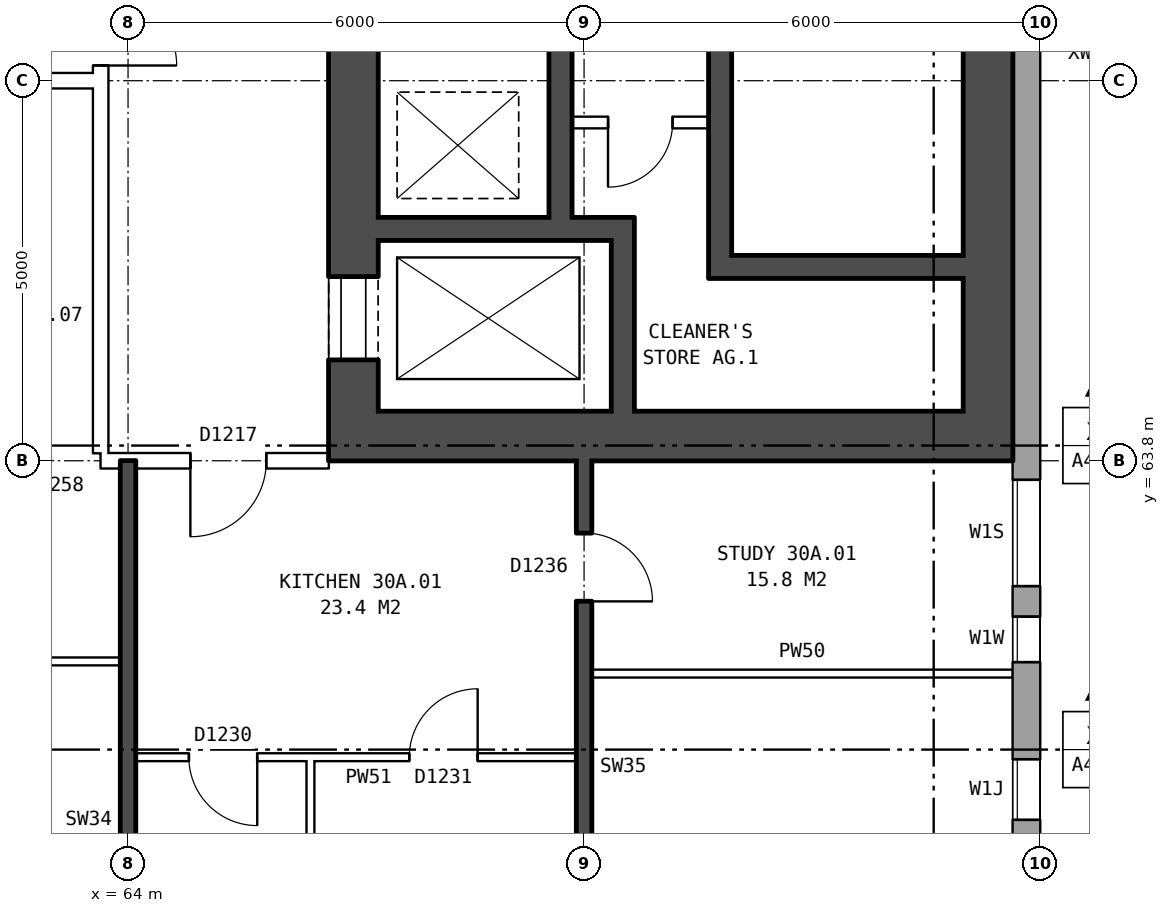
"""IFC4 building model, lengths in metres.
Left out: names, types, materials, properties, quantities, classifications, styles, units other than length and angle.
Written with IfcOpenShell. Run it as: python <this file> out.ifc"""

import sys

from ifc_helpers import new_model, si_unit, direction, frame, frame_2d, origin, place, context, subcontext, project, spatial, rectangle, extrude, element, fill, save


model = new_model("IFC4")
c1 = context("Model", 3, precision=1e-05, world=origin(), true_north=direction((0.0, 1.0)))
c2 = subcontext(c1, "Body", "Model", "MODEL_VIEW")
j1 = project(units=[si_unit("LENGTHUNIT", "METRE"), si_unit("PLANEANGLEUNIT", "RADIAN")], contexts=[c1])
p1 = place(None, origin())
s1 = spatial("IfcSite", under=j1, at=p1, CompositionType="ELEMENT")
p2 = place(p1, origin())
s2 = spatial("IfcBuilding", under=s1, at=p2, CompositionType="ELEMENT")
p3 = place(p2, frame((0.0, 0.0, 108.8)))
s3 = spatial("IfcBuildingStorey", under=s2, at=p3, CompositionType="ELEMENT", Elevation=108.8)
p4 = place(p3, frame((75.82, 57.075, 0.0), z_axis=(0.0, 0.0, 1.0), x_axis=(0.0, 1.0, 0.0)))
e1 = element("IfcWall", 1, at=p4, inside=s3, PredefinedType="STANDARD", context=c2, shape_type="SweptSolid", body=[
    extrude(rectangle(XDim=25.851, YDim=0.36, at=frame_2d((12.925, 0.0))), origin(), (0.0, 0.0, 1.0), 2.85),
])
p5 = place(p4, frame((0.3, 0.0, 0.8)))
e2 = element("IfcOpeningElement", 2, at=p5, cuts=e1, PredefinedType="OPENING", context=c2, shape_type="SweptSolid", body=[
    extrude(rectangle(XDim=1.4, YDim=1.8, at=frame_2d((0.7, 0.9))), frame((0.0, 0.19, 0.0), z_axis=(0.0, -1.0, 0.0), x_axis=(1.0, 0.0, 0.0)), (0.0, 0.0, 1.0), 0.38),
])
p6 = place(p4, frame((4.075, 0.0, 0.25)))
e3 = element("IfcOpeningElement", 3, at=p6, cuts=e1, PredefinedType="OPENING", context=c2, shape_type="SweptSolid", body=[
    extrude(rectangle(XDim=0.6, YDim=0.9, at=frame_2d((0.3, 0.45))), frame((0.0, 0.19, 0.0), z_axis=(0.0, -1.0, 0.0), x_axis=(1.0, 0.0, 0.0)), (0.0, 0.0, 1.0), 0.38),
])
p7 = place(p4, frame((19.225, 0.0, 1.7)))
e4 = element("IfcOpeningElement", 4, at=p7, cuts=e1, PredefinedType="OPENING", context=c2, shape_type="SweptSolid", body=[
    extrude(rectangle(XDim=1.6, YDim=0.9, at=frame_2d((0.8, 0.45))), frame((0.0, 0.19, 0.0), z_axis=(0.0, -1.0, 0.0), x_axis=(1.0, 0.0, 0.0)), (0.0, 0.0, 1.0), 0.38),
])
p8 = place(p4, frame((21.975, 0.0, 0.8)))
e5 = element("IfcOpeningElement", 5, at=p8, cuts=e1, PredefinedType="OPENING", context=c2, shape_type="SweptSolid", body=[
    extrude(rectangle(XDim=1.2, YDim=0.9, at=frame_2d((0.6, 0.45))), frame((0.0, 0.19, 0.0), z_axis=(0.0, -1.0, 0.0), x_axis=(1.0, 0.0, 0.0)), (0.0, 0.0, 1.0), 0.38),
])
p9 = place(p4, frame((2.0, 0.0, 0.8)))
e6 = element("IfcOpeningElement", 6, at=p9, cuts=e1, PredefinedType="OPENING", context=c2, shape_type="SweptSolid", body=[
    extrude(rectangle(XDim=0.8, YDim=1.5, at=frame_2d((0.4, 0.75))), frame((0.0, 0.19, 0.0), z_axis=(0.0, -1.0, 0.0), x_axis=(1.0, 0.0, 0.0)), (0.0, 0.0, 1.0), 0.38),
])
p10 = place(p4, frame((5.075, 0.0, 1.65)))
e7 = element("IfcOpeningElement", 7, at=p10, cuts=e1, PredefinedType="OPENING", context=c2, shape_type="SweptSolid", body=[
    extrude(rectangle(XDim=1.4, YDim=0.9, at=frame_2d((0.7, 0.45))), frame((0.0, 0.19, 0.0), z_axis=(0.0, -1.0, 0.0), x_axis=(1.0, 0.0, 0.0)), (0.0, 0.0, 1.0), 0.38),
])
p11 = place(p4, frame((23.475, 0.0, 0.8)))
e8 = element("IfcOpeningElement", 8, at=p11, cuts=e1, PredefinedType="OPENING", context=c2, shape_type="SweptSolid", body=[
    extrude(rectangle(XDim=1.2, YDim=1.8, at=frame_2d((0.6, 0.9))), frame((0.0, 0.19, 0.0), z_axis=(0.0, -1.0, 0.0), x_axis=(1.0, 0.0, 0.0)), (0.0, 0.0, 1.0), 0.38),
])
p12 = place(p3, frame((66.965, 64.45, 0.0), z_axis=(0.0, 0.0, 1.0), x_axis=(0.0, 1.0, 0.0)))
e9 = element("IfcWall", 9, at=p12, inside=s3, PredefinedType="SHEAR", context=c2, shape_type="SweptSolid", body=[
    extrude(rectangle(XDim=11.1, YDim=0.65, at=frame_2d((5.55, 0.0))), origin(), (0.0, 0.0, 1.0), 2.85),
])
p13 = place(p12, frame((0.675, 0.0, 0.0)))
e10 = element("IfcOpeningElement", 10, at=p13, cuts=e9, PredefinedType="OPENING", context=c2, shape_type="SweptSolid", body=[
    extrude(rectangle(XDim=1.1, YDim=2.1, at=frame_2d((0.55, 1.05))), frame((0.0, 0.335, 0.0), z_axis=(0.0, -1.0, 0.0), x_axis=(1.0, 0.0, 0.0)), (0.0, 0.0, 1.0), 0.67),
])
p14 = place(p12, frame((9.25, 0.0, 0.0)))
e11 = element("IfcOpeningElement", 11, at=p14, cuts=e9, PredefinedType="OPENING", context=c2, shape_type="SweptSolid", body=[
    extrude(rectangle(XDim=1.1, YDim=2.1, at=frame_2d((0.55, 1.05))), frame((0.0, 0.335, 0.0), z_axis=(0.0, -1.0, 0.0), x_axis=(1.0, 0.0, 0.0)), (0.0, 0.0, 1.0), 0.67),
])
p15 = place(p3, frame((75.315, 64.45, 0.0), z_axis=(0.0, 0.0, 1.0), x_axis=(0.0, 1.0, 0.0)))
e12 = element("IfcWall", 12, at=p15, inside=s3, PredefinedType="SHEAR", context=c2, shape_type="SweptSolid", body=[
    extrude(rectangle(XDim=11.1, YDim=0.65, at=frame_2d((5.55, 0.0))), origin(), (0.0, 0.0, 1.0), 2.85),
])
p16 = place(p3, frame((66.64, 64.125, 0.0), z_axis=(0.0, 0.0, 1.0), x_axis=(1.0, 0.0, 0.0)))
e13 = element("IfcWall", 13, at=p16, inside=s3, PredefinedType="SHEAR", context=c2, shape_type="SweptSolid", body=[
    extrude(rectangle(XDim=9.0, YDim=0.65, at=frame_2d((4.5, 0.0))), origin(), (0.0, 0.0, 1.0), 2.85),
])
p17 = place(p3, frame((71.94, 66.35, 0.0), z_axis=(0.0, 0.0, 1.0), x_axis=(1.0, 0.0, 0.0)))
e14 = element("IfcWall", 14, at=p17, inside=s3, PredefinedType="SHEAR", context=c2, shape_type="SweptSolid", body=[
    extrude(rectangle(XDim=3.05, YDim=0.3, at=frame_2d((1.525, 0.0))), origin(), (0.0, 0.0, 1.0), 2.85),
])
p18 = place(p3, frame((67.29, 66.85, 0.0), z_axis=(0.0, 0.0, 1.0), x_axis=(1.0, 0.0, 0.0)))
e15 = element("IfcWall", 15, at=p18, inside=s3, PredefinedType="SHEAR", context=c2, shape_type="SweptSolid", body=[
    extrude(rectangle(XDim=3.37, YDim=0.3, at=frame_2d((1.685, 0.0))), origin(), (0.0, 0.0, 1.0), 2.85),
])
p19 = place(p3, frame((69.84, 68.25, 0.0), z_axis=(0.0, 0.0, 1.0), x_axis=(1.0, 0.0, 0.0)))
e16 = element("IfcWall", 16, at=p19, inside=s3, PredefinedType="PARTITIONING", context=c2, shape_type="SweptSolid", body=[
    extrude(rectangle(XDim=1.8, YDim=0.15, at=frame_2d((0.9, 0.0))), origin(), (0.0, 0.0, 1.0), 2.85),
])
p20 = place(p19, frame((0.475, 0.0, 0.0)))
e17 = element("IfcOpeningElement", 17, at=p20, cuts=e16, PredefinedType="OPENING", context=c2, shape_type="SweptSolid", body=[
    extrude(rectangle(XDim=0.85, YDim=2.1, at=frame_2d((0.425, 1.05))), frame((0.0, 0.085, 0.0), z_axis=(0.0, -1.0, 0.0), x_axis=(1.0, 0.0, 0.0)), (0.0, 0.0, 1.0), 0.17),
])
p21 = place(p3, frame((69.69, 67.0, 0.0), z_axis=(0.0, 0.0, 1.0), x_axis=(0.0, 1.0, 0.0)))
e18 = element("IfcWall", 18, at=p21, inside=s3, PredefinedType="SHEAR", context=c2, shape_type="SweptSolid", body=[
    extrude(rectangle(XDim=6.6, YDim=0.3, at=frame_2d((3.3, 0.0))), origin(), (0.0, 0.0, 1.0), 2.85),
])
p22 = place(p3, frame((70.51, 64.45, 0.0), z_axis=(0.0, 0.0, 1.0), x_axis=(0.0, 1.0, 0.0)))
e19 = element("IfcWall", 19, at=p22, inside=s3, PredefinedType="SHEAR", context=c2, shape_type="SweptSolid", body=[
    extrude(rectangle(XDim=2.25, YDim=0.3, at=frame_2d((1.125, 0.0))), origin(), (0.0, 0.0, 1.0), 2.85),
])
p23 = place(p3, frame((71.79, 66.2, 0.0), z_axis=(0.0, 0.0, 1.0), x_axis=(0.0, 1.0, 0.0)))
e20 = element("IfcWall", 20, at=p23, inside=s3, PredefinedType="SHEAR", context=c2, shape_type="SweptSolid", body=[
    extrude(rectangle(XDim=7.4, YDim=0.3, at=frame_2d((3.7, 0.0))), origin(), (0.0, 0.0, 1.0), 2.85),
])
p24 = place(p3, frame((63.64, 63.9, 0.0), z_axis=(0.0, 0.0, 1.0), x_axis=(0.0, 1.0, 0.0)))
e21 = element("IfcWall", 21, at=p24, inside=s3, PredefinedType="PARTITIONING", context=c2, shape_type="SweptSolid", body=[
    extrude(rectangle(XDim=12.2, YDim=0.2, at=frame_2d((6.1, 0.0))), origin(), (0.0, 0.0, 1.0), 2.85),
])
p25 = place(p24, frame((5.1, 0.0, 0.0)))
e22 = element("IfcOpeningElement", 22, at=p25, cuts=e21, PredefinedType="OPENING", context=c2, shape_type="SweptSolid", body=[
    extrude(rectangle(XDim=2.0, YDim=2.1, at=frame_2d((1.0, 1.05))), frame((0.0, 0.11, 0.0), z_axis=(0.0, -1.0, 0.0), x_axis=(1.0, 0.0, 0.0)), (0.0, 0.0, 1.0), 0.22),
])
p26 = place(p3, frame((64.1, 59.9, 0.0), z_axis=(0.0, 0.0, 1.0), x_axis=(1.0, 0.0, 0.0)))
e23 = element("IfcWall", 23, at=p26, inside=s3, PredefinedType="PARTITIONING", context=c2, shape_type="SweptSolid", body=[
    extrude(rectangle(XDim=5.8, YDim=0.1, at=frame_2d((2.9, 0.0))), origin(), (0.0, 0.0, 1.0), 2.85),
])
p27 = place(p26, frame((3.6, 0.0, 0.0)))
e24 = element("IfcOpeningElement", 24, at=p27, cuts=e23, PredefinedType="OPENING", context=c2, shape_type="SweptSolid", body=[
    extrude(rectangle(XDim=0.9, YDim=2.1, at=frame_2d((0.45, 1.05))), frame((0.0, 0.06, 0.0), z_axis=(0.0, -1.0, 0.0), x_axis=(1.0, 0.0, 0.0)), (0.0, 0.0, 1.0), 0.12),
])
p28 = place(p26, frame((0.7, 0.0, 0.0)))
e25 = element("IfcOpeningElement", 25, at=p28, cuts=e23, PredefinedType="OPENING", context=c2, shape_type="SweptSolid", body=[
    extrude(rectangle(XDim=0.9, YDim=2.1, at=frame_2d((0.45, 1.05))), frame((0.0, 0.06, 0.0), z_axis=(0.0, -1.0, 0.0), x_axis=(1.0, 0.0, 0.0)), (0.0, 0.0, 1.0), 0.12),
])
p29 = place(p3, frame((70.1, 61.0, 0.0), z_axis=(0.0, 0.0, 1.0), x_axis=(1.0, 0.0, 0.0)))
e26 = element("IfcWall", 26, at=p29, inside=s3, PredefinedType="PARTITIONING", context=c2, shape_type="SweptSolid", body=[
    extrude(rectangle(XDim=5.54, YDim=0.1, at=frame_2d((2.77, 0.0))), origin(), (0.0, 0.0, 1.0), 2.85),
])
p30 = place(p3, frame((61.0, 61.16, 0.0), z_axis=(0.0, 0.0, 1.0), x_axis=(1.0, 0.0, 0.0)))
e27 = element("IfcWall", 27, at=p30, inside=s3, PredefinedType="PARTITIONING", context=c2, shape_type="SweptSolid", body=[
    extrude(rectangle(XDim=2.9, YDim=0.1, at=frame_2d((1.45, 0.0))), origin(), (0.0, 0.0, 1.0), 2.85),
])
p31 = place(p30, frame((1.0, 0.0, 0.0)))
e28 = element("IfcOpeningElement", 28, at=p31, cuts=e27, PredefinedType="OPENING", context=c2, shape_type="SweptSolid", body=[
    extrude(rectangle(XDim=0.9, YDim=2.1, at=frame_2d((0.45, 1.05))), frame((0.0, 0.06, 0.0), z_axis=(0.0, -1.0, 0.0), x_axis=(1.0, 0.0, 0.0)), (0.0, 0.0, 1.0), 0.12),
])
p32 = place(p3, frame((63.64, 63.8, 0.0), z_axis=(0.0, 0.0, 1.0), x_axis=(1.0, 0.0, 0.0)))
e29 = element("IfcWall", 29, at=p32, inside=s3, PredefinedType="PARTITIONING", context=c2, shape_type="SweptSolid", body=[
    extrude(rectangle(XDim=3.0, YDim=0.2, at=frame_2d((1.5, 0.0))), origin(), (0.0, 0.0, 1.0), 2.85),
])
p33 = place(p32, frame((1.18, 0.0, 0.0)))
e30 = element("IfcOpeningElement", 30, at=p33, cuts=e29, PredefinedType="OPENING", context=c2, shape_type="SweptSolid", body=[
    extrude(rectangle(XDim=1.0, YDim=2.1, at=frame_2d((0.5, 1.05))), frame((0.0, 0.11, 0.0), z_axis=(0.0, -1.0, 0.0), x_axis=(1.0, 0.0, 0.0)), (0.0, 0.0, 1.0), 0.22),
])
p34 = place(p3, frame((44.36, 68.8, 0.0), z_axis=(0.0, 0.0, 1.0), x_axis=(1.0, 0.0, 0.0)))
e31 = element("IfcWall", 31, at=p34, inside=s3, PredefinedType="PARTITIONING", context=c2, shape_type="SweptSolid", body=[
    extrude(rectangle(XDim=19.28, YDim=0.2, at=frame_2d((9.64, 0.0))), origin(), (0.0, 0.0, 1.0), 2.85),
])
p35 = place(p34, frame((17.46, 0.0, 0.0)))
e32 = element("IfcOpeningElement", 32, at=p35, cuts=e31, PredefinedType="OPENING", context=c2, shape_type="SweptSolid", body=[
    extrude(rectangle(XDim=1.0, YDim=2.1, at=frame_2d((0.5, 1.05))), frame((0.0, 0.11, 0.0), z_axis=(0.0, -1.0, 0.0), x_axis=(1.0, 0.0, 0.0)), (0.0, 0.0, 1.0), 0.22),
])
p36 = place(p34, frame((11.64, 0.0, 0.0)))
e33 = element("IfcOpeningElement", 33, at=p36, cuts=e31, PredefinedType="OPENING", context=c2, shape_type="SweptSolid", body=[
    extrude(rectangle(XDim=1.0, YDim=2.1, at=frame_2d((0.5, 1.05))), frame((0.0, 0.11, 0.0), z_axis=(0.0, -1.0, 0.0), x_axis=(1.0, 0.0, 0.0)), (0.0, 0.0, 1.0), 0.22),
])
p37 = place(p34, frame((2.64, 0.0, 0.0)))
e34 = element("IfcOpeningElement", 34, at=p37, cuts=e31, PredefinedType="OPENING", context=c2, shape_type="SweptSolid", body=[
    extrude(rectangle(XDim=1.0, YDim=2.1, at=frame_2d((0.5, 1.05))), frame((0.0, 0.11, 0.0), z_axis=(0.0, -1.0, 0.0), x_axis=(1.0, 0.0, 0.0)), (0.0, 0.0, 1.0), 0.22),
])
p38 = place(p3, frame((64.0, 54.36, 0.0), z_axis=(0.0, 0.0, 1.0), x_axis=(0.0, 1.0, 0.0)))
e35 = element("IfcWall", 35, at=p38, inside=s3, PredefinedType="SOLIDWALL", context=c2, shape_type="SweptSolid", body=[
    extrude(rectangle(XDim=9.44, YDim=0.2, at=frame_2d((4.72, 0.0))), origin(), (0.0, 0.0, 1.0), 2.85),
])
p39 = place(p3, frame((66.4, 57.45, 0.0), z_axis=(0.0, 0.0, 1.0), x_axis=(0.0, 1.0, 0.0)))
e36 = element("IfcWall", 36, at=p39, inside=s3, PredefinedType="PARTITIONING", context=c2, shape_type="SweptSolid", body=[
    extrude(rectangle(XDim=2.4, YDim=0.1, at=frame_2d((1.2, 0.0))), origin(), (0.0, 0.0, 1.0), 2.85),
])
p40 = place(p3, frame((70.0, 54.36, 0.0), z_axis=(0.0, 0.0, 1.0), x_axis=(0.0, 1.0, 0.0)))
e37 = element("IfcWall", 37, at=p40, inside=s3, PredefinedType="SOLIDWALL", context=c2, shape_type="SweptSolid", body=[
    extrude(rectangle(XDim=9.44, YDim=0.2, at=frame_2d((4.72, 0.0))), origin(), (0.0, 0.0, 1.0), 2.85),
])
p41 = place(p40, frame((2.32, 0.0, 0.0)))
e38 = element("IfcOpeningElement", 38, at=p41, cuts=e37, PredefinedType="OPENING", context=c2, shape_type="SweptSolid", body=[
    extrude(rectangle(XDim=0.9, YDim=2.1, at=frame_2d((0.45, 1.05))), frame((0.0, 0.11, 0.0), z_axis=(0.0, -1.0, 0.0), x_axis=(1.0, 0.0, 0.0)), (0.0, 0.0, 1.0), 0.22),
])
p42 = place(p40, frame((7.59, 0.0, 0.0)))
e39 = element("IfcOpeningElement", 39, at=p42, cuts=e37, PredefinedType="OPENING", context=c2, shape_type="SweptSolid", body=[
    extrude(rectangle(XDim=0.9, YDim=2.1, at=frame_2d((0.45, 1.05))), frame((0.0, 0.11, 0.0), z_axis=(0.0, -1.0, 0.0), x_axis=(1.0, 0.0, 0.0)), (0.0, 0.0, 1.0), 0.22),
])
p43 = place(p6, origin())
e40 = element("IfcWindow", 40, at=p43, inside=s3, PartitioningType="SINGLE_PANEL", PredefinedType="WINDOW", context=c2, shape_type="SweptSolid", body=[
    extrude(rectangle(XDim=0.6, YDim=0.9, at=frame_2d((0.3, 0.45))), frame((0.0, 0.15, 0.0), z_axis=(0.0, -1.0, 0.0), x_axis=(1.0, 0.0, 0.0)), (0.0, 0.0, 1.0), 0.06),
])
fill(e3, e40)
p44 = place(p13, origin())
e41 = element("IfcDoor", 41, at=p44, inside=s3, OperationType="DOUBLE_DOOR_SLIDING", PredefinedType="DOOR", context=c2, shape_type="SweptSolid", body=[
    extrude(rectangle(XDim=1.1, YDim=2.1, at=frame_2d((0.55, 1.05))), frame((0.0, -0.26, 0.0), z_axis=(0.0, -1.0, 0.0), x_axis=(1.0, 0.0, 0.0)), (0.0, 0.0, 1.0), 0.05),
])
fill(e10, e41)
p45 = place(p20, frame((0.85, 0.0, 0.0), z_axis=(0.0, 0.0, 1.0), x_axis=(-1.0, 0.0, 0.0)))
e42 = element("IfcDoor", 42, at=p45, inside=s3, OperationType="SINGLE_SWING_RIGHT", PredefinedType="DOOR", context=c2, shape_type="SweptSolid", body=[
    extrude(rectangle(XDim=0.85, YDim=2.1, at=frame_2d((0.425, 1.05))), frame((0.0, 0.025, 0.0), z_axis=(0.0, -1.0, 0.0), x_axis=(1.0, 0.0, 0.0)), (0.0, 0.0, 1.0), 0.05),
])
fill(e17, e42)
p46 = place(p25, frame((2.0, 0.0, 0.0), z_axis=(0.0, 0.0, 1.0), x_axis=(-1.0, 0.0, 0.0)))
e43 = element("IfcDoor", 43, at=p46, inside=s3, OperationType="DOUBLE_DOOR_SINGLE_SWING", PredefinedType="DOOR", context=c2, shape_type="SweptSolid", body=[
    extrude(rectangle(XDim=2.0, YDim=2.1, at=frame_2d((1.0, 1.05))), frame((0.0, 0.025, 0.0), z_axis=(0.0, -1.0, 0.0), x_axis=(1.0, 0.0, 0.0)), (0.0, 0.0, 1.0), 0.05),
])
fill(e22, e43)
p47 = place(p42, frame((0.9, 0.0, 0.0), z_axis=(0.0, 0.0, 1.0), x_axis=(-1.0, 0.0, 0.0)))
e44 = element("IfcDoor", 44, at=p47, inside=s3, OperationType="SINGLE_SWING_RIGHT", PredefinedType="DOOR", context=c2, shape_type="SweptSolid", body=[
    extrude(rectangle(XDim=0.9, YDim=2.1, at=frame_2d((0.45, 1.05))), frame((0.0, 0.025, 0.0), z_axis=(0.0, -1.0, 0.0), x_axis=(1.0, 0.0, 0.0)), (0.0, 0.0, 1.0), 0.05),
])
fill(e39, e44)
p48 = place(p33, frame((1.0, 0.0, 0.0), z_axis=(0.0, 0.0, 1.0), x_axis=(-1.0, 0.0, 0.0)))
e45 = element("IfcDoor", 45, at=p48, inside=s3, OperationType="SINGLE_SWING_RIGHT", PredefinedType="DOOR", context=c2, shape_type="SweptSolid", body=[
    extrude(rectangle(XDim=1.0, YDim=2.1, at=frame_2d((0.5, 1.05))), frame((0.0, 0.025, 0.0), z_axis=(0.0, -1.0, 0.0), x_axis=(1.0, 0.0, 0.0)), (0.0, 0.0, 1.0), 0.05),
])
fill(e30, e45)
p49 = place(p27, origin())
e46 = element("IfcDoor", 46, at=p49, inside=s3, OperationType="SINGLE_SWING_RIGHT", PredefinedType="DOOR", context=c2, shape_type="SweptSolid", body=[
    extrude(rectangle(XDim=0.9, YDim=2.1, at=frame_2d((0.45, 1.05))), frame((0.0, 0.025, 0.0), z_axis=(0.0, -1.0, 0.0), x_axis=(1.0, 0.0, 0.0)), (0.0, 0.0, 1.0), 0.05),
])
fill(e24, e46)
p50 = place(p28, frame((0.9, 0.0, 0.0), z_axis=(0.0, 0.0, 1.0), x_axis=(-1.0, 0.0, 0.0)))
e47 = element("IfcDoor", 47, at=p50, inside=s3, OperationType="SINGLE_SWING_LEFT", PredefinedType="DOOR", context=c2, shape_type="SweptSolid", body=[
    extrude(rectangle(XDim=0.9, YDim=2.1, at=frame_2d((0.45, 1.05))), frame((0.0, 0.025, 0.0), z_axis=(0.0, -1.0, 0.0), x_axis=(1.0, 0.0, 0.0)), (0.0, 0.0, 1.0), 0.05),
])
fill(e25, e47)
p51 = place(p9, origin())
e48 = element("IfcWindow", 48, at=p51, inside=s3, PartitioningType="SINGLE_PANEL", PredefinedType="WINDOW", context=c2, shape_type="SweptSolid", body=[
    extrude(rectangle(XDim=0.8, YDim=1.5, at=frame_2d((0.4, 0.75))), frame((0.0, 0.15, 0.0), z_axis=(0.0, -1.0, 0.0), x_axis=(1.0, 0.0, 0.0)), (0.0, 0.0, 1.0), 0.06),
])
fill(e6, e48)
p52 = place(p10, origin())
e49 = element("IfcWindow", 49, at=p52, inside=s3, PartitioningType="SINGLE_PANEL", PredefinedType="WINDOW", context=c2, shape_type="SweptSolid", body=[
    extrude(rectangle(XDim=1.4, YDim=0.9, at=frame_2d((0.7, 0.45))), frame((0.0, 0.15, 0.0), z_axis=(0.0, -1.0, 0.0), x_axis=(1.0, 0.0, 0.0)), (0.0, 0.0, 1.0), 0.06),
])
fill(e7, e49)
save(model, sys.argv[1])
